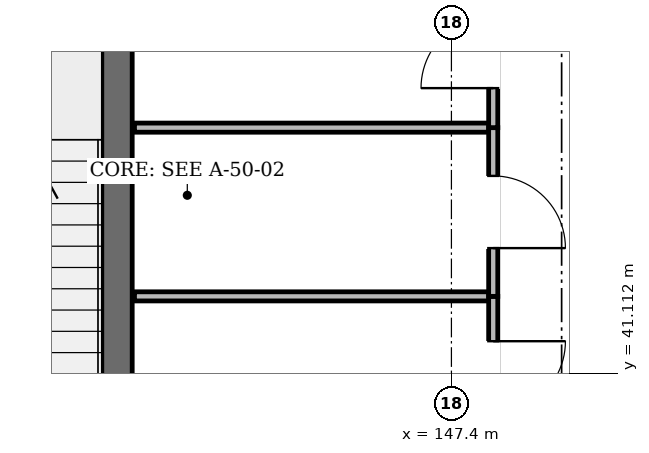
"""IFC4 building model, lengths in metres.
Left out: names, types, materials, properties, quantities, classifications, styles, units other than length and angle.
Written with IfcOpenShell. Run it as: python <this file> out.ifc"""

import sys

from ifc_helpers import new_model, si_unit, direction, frame, frame_2d, origin, place, context, subcontext, project, spatial, rectangle, extrude, element, fill, save


model = new_model("IFC4")
c1 = context("Model", 3, precision=1e-05, world=origin(), true_north=direction((0.0, 1.0)))
c2 = subcontext(c1, "Body", "Model", "MODEL_VIEW")
j1 = project(units=[si_unit("LENGTHUNIT", "METRE"), si_unit("PLANEANGLEUNIT", "RADIAN")], contexts=[c1])
p1 = place(None, origin())
s1 = spatial("IfcSite", under=j1, at=p1, CompositionType="ELEMENT")
p2 = place(p1, origin())
s2 = spatial("IfcBuilding", under=s1, at=p2, CompositionType="ELEMENT")
p3 = place(p2, frame((0.0, 0.0, 19.8)))
s3 = spatial("IfcBuildingStorey", under=s2, at=p3, CompositionType="ELEMENT", Elevation=19.8)
p4 = place(p3, frame((143.0, 39.7, 0.0), z_axis=(0.0, 0.0, 1.0), x_axis=(0.0, 1.0, 0.0)))
e1 = element("IfcWall", 1, at=p4, inside=s3, PredefinedType="SHEAR", context=c2, shape_type="SweptSolid", body=[
    extrude(rectangle(XDim=7.0, YDim=0.4, at=frame_2d((3.5, 0.0))), origin(), (0.0, 0.0, 1.0), 3.94),
])
p5 = place(p3, frame((143.23, 42.12, 0.0), z_axis=(0.0, 0.0, 1.0), x_axis=(1.0, 0.0, 0.0)))
e2 = element("IfcWall", 2, at=p5, inside=s3, PredefinedType="PARTITIONING", context=c2, shape_type="SweptSolid", body=[
    extrude(rectangle(XDim=4.72, YDim=0.12, at=frame_2d((2.36, 0.0))), origin(), (0.0, 0.0, 1.0), 3.415),
])
p6 = place(p3, frame((147.95, 42.12, 0.0), z_axis=(0.0, 0.0, 1.0), x_axis=(0.0, -1.0, 0.0)))
e3 = element("IfcWall", 3, at=p6, inside=s3, PredefinedType="PARTITIONING", context=c2, shape_type="SweptSolid", body=[
    extrude(rectangle(XDim=2.13, YDim=0.12, at=frame_2d((1.065, 0.0))), origin(), (0.0, 0.0, 1.0), 3.805),
])
p7 = place(p6, frame((0.59, 0.0, 0.0)))
e4 = element("IfcOpeningElement", 4, at=p7, cuts=e3, PredefinedType="OPENING", context=c2, shape_type="SweptSolid", body=[
    extrude(rectangle(XDim=0.95, YDim=2.15, at=frame_2d((0.475, 1.075))), frame((0.0, 0.072, 0.0), z_axis=(0.0, -1.0, 0.0), x_axis=(1.0, 0.0, 0.0)), (0.0, 0.0, 1.0), 0.144),
])
p8 = place(p3, frame((143.23, 44.34, 0.0), z_axis=(0.0, 0.0, 1.0), x_axis=(1.0, 0.0, 0.0)))
e5 = element("IfcWall", 5, at=p8, inside=s3, PredefinedType="PARTITIONING", context=c2, shape_type="SweptSolid", body=[
    extrude(rectangle(XDim=4.72, YDim=0.12, at=frame_2d((2.36, 0.0))), origin(), (0.0, 0.0, 1.0), 3.365),
])
p9 = place(p3, frame((147.95, 44.34, 0.0), z_axis=(0.0, 0.0, 1.0), x_axis=(0.0, -1.0, 0.0)))
e6 = element("IfcWall", 6, at=p9, inside=s3, PredefinedType="PARTITIONING", context=c2, shape_type="SweptSolid", body=[
    extrude(rectangle(XDim=2.22, YDim=0.12, at=frame_2d((1.11, 0.0))), origin(), (0.0, 0.0, 1.0), 3.805),
])
p10 = place(p9, frame((0.635, 0.0, 0.0)))
e7 = element("IfcOpeningElement", 7, at=p10, cuts=e6, PredefinedType="OPENING", context=c2, shape_type="SweptSolid", body=[
    extrude(rectangle(XDim=0.95, YDim=2.15, at=frame_2d((0.475, 1.075))), frame((0.0, 0.072, 0.0), z_axis=(0.0, -1.0, 0.0), x_axis=(1.0, 0.0, 0.0)), (0.0, 0.0, 1.0), 0.144),
])
p11 = place(p3, frame((147.95, 46.33, 0.0), z_axis=(0.0, 0.0, 1.0), x_axis=(0.0, -1.0, 0.0)))
e8 = element("IfcWall", 8, at=p11, inside=s3, PredefinedType="PARTITIONING", context=c2, shape_type="SweptSolid", body=[
    extrude(rectangle(XDim=1.99, YDim=0.12, at=frame_2d((0.995, 0.0))), origin(), (0.0, 0.0, 1.0), 3.805),
])
p12 = place(p11, frame((0.52, 0.0, 0.0)))
e9 = element("IfcOpeningElement", 9, at=p12, cuts=e8, PredefinedType="OPENING", context=c2, shape_type="SweptSolid", body=[
    extrude(rectangle(XDim=0.95, YDim=2.15, at=frame_2d((0.475, 1.075))), frame((0.0, 0.072, 0.0), z_axis=(0.0, -1.0, 0.0), x_axis=(1.0, 0.0, 0.0)), (0.0, 0.0, 1.0), 0.144),
])
p13 = place(p7, origin())
e10 = element("IfcDoor", 10, at=p13, inside=s3, OperationType="SINGLE_SWING_LEFT", PredefinedType="DOOR", context=c2, shape_type="SweptSolid", body=[
    extrude(rectangle(XDim=0.95, YDim=2.15, at=frame_2d((0.475, 1.075))), frame((0.0, 0.025, 0.0), z_axis=(0.0, -1.0, 0.0), x_axis=(1.0, 0.0, 0.0)), (0.0, 0.0, 1.0), 0.05),
])
fill(e4, e10)
p14 = place(p10, origin())
e11 = element("IfcDoor", 11, at=p14, inside=s3, OperationType="SINGLE_SWING_RIGHT", PredefinedType="DOOR", context=c2, shape_type="SweptSolid", body=[
    extrude(rectangle(XDim=0.95, YDim=2.15, at=frame_2d((0.475, 1.075))), frame((0.0, 0.025, 0.0), z_axis=(0.0, -1.0, 0.0), x_axis=(1.0, 0.0, 0.0)), (0.0, 0.0, 1.0), 0.05),
])
fill(e7, e11)
p15 = place(p12, frame((0.95, 0.0, 0.0), z_axis=(0.0, 0.0, 1.0), x_axis=(-1.0, 0.0, 0.0)))
e12 = element("IfcDoor", 12, at=p15, inside=s3, OperationType="SINGLE_SWING_LEFT", PredefinedType="DOOR", context=c2, shape_type="SweptSolid", body=[
    extrude(rectangle(XDim=0.95, YDim=2.15, at=frame_2d((0.475, 1.075))), frame((0.0, 0.025, 0.0), z_axis=(0.0, -1.0, 0.0), x_axis=(1.0, 0.0, 0.0)), (0.0, 0.0, 1.0), 0.05),
])
fill(e9, e12)
save(model, sys.argv[1])
